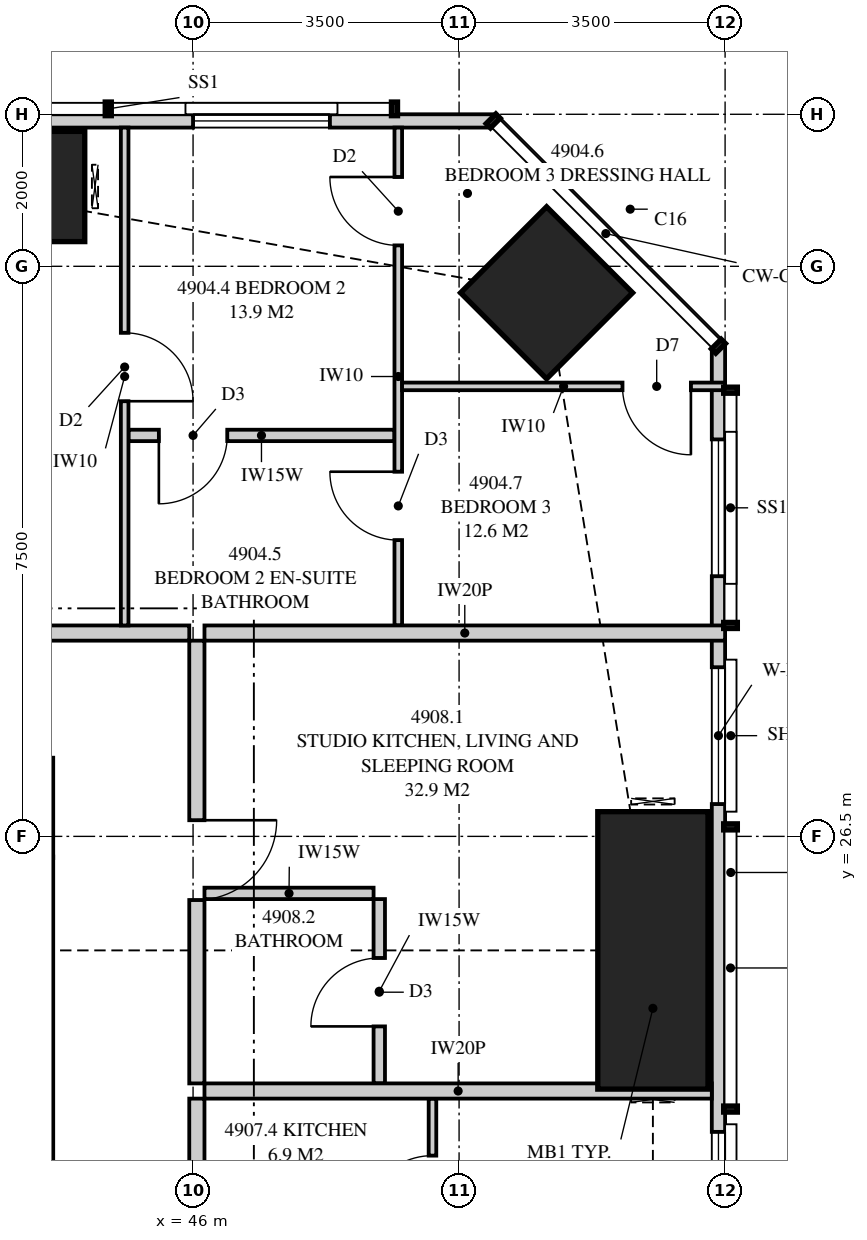
"""IFC4 building model, lengths in metres.
Left out: names, types, materials, properties, quantities, classifications, styles, units other than length and angle.
Written with IfcOpenShell. Run it as: python <this file> out.ifc"""

import sys

from ifc_helpers import new_model, si_unit, direction, frame, frame_2d, origin, origin_2d, place, context, subcontext, project, spatial, polyline, rectangle, outline, extrude, element, fill, save


model = new_model("IFC4")
c1 = context("Model", 3, precision=1e-05, world=origin(), true_north=direction((0.0, 1.0)))
c2 = subcontext(c1, "Body", "Model", "MODEL_VIEW")
j1 = project(units=[si_unit("LENGTHUNIT", "METRE"), si_unit("PLANEANGLEUNIT", "RADIAN")], contexts=[c1])
p1 = place(None, origin())
s1 = spatial("IfcSite", under=j1, at=p1, CompositionType="ELEMENT")
p2 = place(p1, origin())
s2 = spatial("IfcBuilding", under=s1, at=p2, CompositionType="ELEMENT")
p3 = place(p2, frame((0.0, 0.0, 181.15)))
s3 = spatial("IfcBuildingStorey", under=s2, at=p3, CompositionType="ELEMENT", Elevation=181.15)
p4 = place(p3, frame((52.05, 25.0, 0.0), z_axis=(0.0, 0.0, 1.0), x_axis=(1.0, 0.0, 0.0)))
e1 = element("IfcColumn", 1, at=p4, inside=s3, PredefinedType="COLUMN", context=c2, shape_type="SweptSolid", body=[
    extrude(rectangle(XDim=1.45, YDim=3.65, at=origin_2d()), origin(), (0.0, 0.0, 1.0), 3.35),
])
p5 = place(p3, frame((50.652, 33.652, 0.0), z_axis=(0.0, 0.0, 1.0), x_axis=(0.707106781187, 0.707106781187, 0.0)))
e2 = element("IfcColumn", 2, at=p5, inside=s3, PredefinedType="COLUMN", context=c2, shape_type="SweptSolid", body=[
    extrude(rectangle(XDim=1.6, YDim=1.6, at=origin_2d()), origin(), (0.0, 0.0, 1.0), 3.35),
])
p6 = place(p3, frame((42.75, 35.05, 0.0), z_axis=(0.0, 0.0, 1.0), x_axis=(0.0, 1.0, 0.0)))
e3 = element("IfcColumn", 3, at=p6, inside=s3, PredefinedType="COLUMN", context=c2, shape_type="SweptSolid", body=[
    extrude(rectangle(XDim=1.45, YDim=3.65, at=origin_2d()), origin(), (0.0, 0.0, 1.0), 3.35),
])
p7 = place(p3, frame((43.8, 19.3, 0.0), z_axis=(0.0, 0.0, 1.0), x_axis=(0.0, 1.0, 0.0)))
e4 = element("IfcWall", 4, at=p7, inside=s3, PredefinedType="SHEAR", context=c2, shape_type="SweptSolid", body=[
    extrude(rectangle(XDim=6.925, YDim=0.7, at=frame_2d((3.462, 0.0))), origin(), (0.0, 0.0, 1.0), 3.35),
])
p8 = place(p3, frame((52.913, 3.051, 0.0), z_axis=(0.0, 0.0, 1.0), x_axis=(0.0, 1.0, 0.0)))
e5 = element("IfcWall", 5, at=p8, inside=s3, PredefinedType="SOLIDWALL", context=c2, shape_type="SweptSolid", body=[
    extrude(outline(polyline([(0.0, 0.0), (29.897, 0.0), (29.897, 3.11), (22.167, 3.11), (22.167, 2.15), (22.074, 2.15), (22.074, 3.11), (21.949, 3.11), (21.949, 2.15), (9.949, 2.15), (9.949, 3.11), (9.847, 3.11), (9.847, 2.15), (9.706, 2.15), (9.706, 3.11), (0.0, 3.11), (0.0, 0.0)])), frame((0.0, 0.087, 0.0), z_axis=(0.0, -1.0, 0.0), x_axis=(1.0, 0.0, 0.0)), (0.0, 0.0, 1.0), 0.175),
])
p9 = place(p8, frame((6.808, 0.0, 0.4)))
e6 = element("IfcOpeningElement", 6, at=p9, cuts=e5, PredefinedType="OPENING", context=c2, shape_type="SweptSolid", body=[
    extrude(rectangle(XDim=1.2, YDim=1.7, at=frame_2d((0.6, 0.85))), frame((0.0, 0.097, 0.0), z_axis=(0.0, -1.0, 0.0), x_axis=(1.0, 0.0, 0.0)), (0.0, 0.0, 1.0), 0.195),
])
p10 = place(p8, frame((12.424, 0.0, 0.4)))
e7 = element("IfcOpeningElement", 7, at=p10, cuts=e5, PredefinedType="OPENING", context=c2, shape_type="SweptSolid", body=[
    extrude(rectangle(XDim=1.8, YDim=1.7, at=frame_2d((0.9, 0.85))), frame((0.0, 0.097, 0.0), z_axis=(0.0, -1.0, 0.0), x_axis=(1.0, 0.0, 0.0)), (0.0, 0.0, 1.0), 0.195),
])
p11 = place(p8, frame((15.324, 0.0, 0.0)))
e8 = element("IfcOpeningElement", 8, at=p11, cuts=e5, PredefinedType="OPENING", context=c2, shape_type="SweptSolid", body=[
    extrude(rectangle(XDim=1.8, YDim=2.1, at=frame_2d((0.9, 1.05))), frame((0.0, 0.097, 0.0), z_axis=(0.0, -1.0, 0.0), x_axis=(1.0, 0.0, 0.0)), (0.0, 0.0, 1.0), 0.195),
])
p12 = place(p8, frame((17.761, 0.0, 0.4)))
e9 = element("IfcOpeningElement", 9, at=p12, cuts=e5, PredefinedType="OPENING", context=c2, shape_type="SweptSolid", body=[
    extrude(rectangle(XDim=1.8, YDim=1.7, at=frame_2d((0.9, 0.85))), frame((0.0, 0.097, 0.0), z_axis=(0.0, -1.0, 0.0), x_axis=(1.0, 0.0, 0.0)), (0.0, 0.0, 1.0), 0.195),
])
p13 = place(p8, frame((23.874, 0.0, 0.4)))
e10 = element("IfcOpeningElement", 10, at=p13, cuts=e5, PredefinedType="OPENING", context=c2, shape_type="SweptSolid", body=[
    extrude(rectangle(XDim=1.8, YDim=1.7, at=frame_2d((0.9, 0.85))), frame((0.0, 0.097, 0.0), z_axis=(0.0, -1.0, 0.0), x_axis=(1.0, 0.0, 0.0)), (0.0, 0.0, 1.0), 0.195),
])
p14 = place(p8, frame((26.871, 0.0, 0.4)))
e11 = element("IfcOpeningElement", 11, at=p14, cuts=e5, PredefinedType="OPENING", context=c2, shape_type="SweptSolid", body=[
    extrude(rectangle(XDim=1.8, YDim=1.7, at=frame_2d((0.9, 0.85))), frame((0.0, 0.097, 0.0), z_axis=(0.0, -1.0, 0.0), x_axis=(1.0, 0.0, 0.0)), (0.0, 0.0, 1.0), 0.195),
])
p15 = place(p3, frame((49.949, 35.913, 0.0), z_axis=(0.0, 0.0, 1.0), x_axis=(-1.0, 0.0, 0.0)))
e12 = element("IfcWall", 12, at=p15, inside=s3, PredefinedType="SOLIDWALL", context=c2, shape_type="SweptSolid", body=[
    extrude(outline(polyline([(0.0, 0.0), (34.897, 0.0), (34.897, 3.11), (27.91, 3.11), (27.91, 2.15), (27.836, 2.15), (27.836, 3.11), (27.699, 3.11), (27.699, 2.15), (7.199, 2.15), (7.199, 3.11), (7.062, 3.11), (7.062, 2.15), (6.987, 2.15), (6.987, 3.11), (0.0, 3.11), (0.0, 0.0)])), frame((0.0, 0.087, 0.0), z_axis=(0.0, -1.0, 0.0), x_axis=(1.0, 0.0, 0.0)), (0.0, 0.0, 1.0), 0.175),
])
p16 = place(p15, frame((2.149, 0.0, 0.4)))
e13 = element("IfcOpeningElement", 13, at=p16, cuts=e12, PredefinedType="OPENING", context=c2, shape_type="SweptSolid", body=[
    extrude(rectangle(XDim=1.8, YDim=1.7, at=frame_2d((0.9, 0.85))), frame((0.0, 0.097, 0.0), z_axis=(0.0, -1.0, 0.0), x_axis=(1.0, 0.0, 0.0)), (0.0, 0.0, 1.0), 0.195),
])
p17 = place(p15, frame((9.13, 0.0, 0.4)))
e14 = element("IfcOpeningElement", 14, at=p17, cuts=e12, PredefinedType="OPENING", context=c2, shape_type="SweptSolid", body=[
    extrude(rectangle(XDim=1.2, YDim=1.7, at=frame_2d((0.6, 0.85))), frame((0.0, 0.097, 0.0), z_axis=(0.0, -1.0, 0.0), x_axis=(1.0, 0.0, 0.0)), (0.0, 0.0, 1.0), 0.195),
])
p18 = place(p15, frame((13.174, 0.0, 0.0)))
e15 = element("IfcOpeningElement", 15, at=p18, cuts=e12, PredefinedType="OPENING", context=c2, shape_type="SweptSolid", body=[
    extrude(rectangle(XDim=1.8, YDim=2.1, at=frame_2d((0.9, 1.05))), frame((0.0, 0.097, 0.0), z_axis=(0.0, -1.0, 0.0), x_axis=(1.0, 0.0, 0.0)), (0.0, 0.0, 1.0), 0.195),
])
p19 = place(p15, frame((20.724, 0.0, 0.4)))
e16 = element("IfcOpeningElement", 16, at=p19, cuts=e12, PredefinedType="OPENING", context=c2, shape_type="SweptSolid", body=[
    extrude(rectangle(XDim=1.8, YDim=1.7, at=frame_2d((0.9, 0.85))), frame((0.0, 0.097, 0.0), z_axis=(0.0, -1.0, 0.0), x_axis=(1.0, 0.0, 0.0)), (0.0, 0.0, 1.0), 0.195),
])
p20 = place(p15, frame((23.929, 0.0, 0.4)))
e17 = element("IfcOpeningElement", 17, at=p20, cuts=e12, PredefinedType="OPENING", context=c2, shape_type="SweptSolid", body=[
    extrude(rectangle(XDim=1.8, YDim=1.7, at=frame_2d((0.9, 0.85))), frame((0.0, 0.097, 0.0), z_axis=(0.0, -1.0, 0.0), x_axis=(1.0, 0.0, 0.0)), (0.0, 0.0, 1.0), 0.195),
])
p21 = place(p15, frame((31.523, 0.0, 0.4)))
e18 = element("IfcOpeningElement", 18, at=p21, cuts=e12, PredefinedType="OPENING", context=c2, shape_type="SweptSolid", body=[
    extrude(rectangle(XDim=1.2, YDim=1.7, at=frame_2d((0.6, 0.85))), frame((0.0, 0.097, 0.0), z_axis=(0.0, -1.0, 0.0), x_axis=(1.0, 0.0, 0.0)), (0.0, 0.0, 1.0), 0.195),
])
p22 = place(p3, frame((45.1, 35.825, 0.0), z_axis=(0.0, 0.0, 1.0), x_axis=(0.0, -1.0, 0.0)))
e19 = element("IfcWall", 19, at=p22, inside=s3, PredefinedType="PARTITIONING", context=c2, shape_type="SweptSolid", body=[
    extrude(outline(polyline([(0.0, 0.0), (6.55, 0.0), (6.55, 3.11), (2.064, 3.11), (2.064, 2.15), (0.318, 2.15), (0.318, 3.11), (0.0, 3.11), (0.0, 0.0)])), frame((0.0, 0.05, 0.0), z_axis=(0.0, -1.0, 0.0), x_axis=(1.0, 0.0, 0.0)), (0.0, 0.0, 1.0), 0.1),
])
p23 = place(p22, frame((2.7, 0.0, 0.0)))
e20 = element("IfcOpeningElement", 20, at=p23, cuts=e19, PredefinedType="OPENING", context=c2, shape_type="SweptSolid", body=[
    extrude(rectangle(XDim=0.9, YDim=2.1, at=frame_2d((0.45, 1.05))), frame((0.0, 0.06, 0.0), z_axis=(0.0, -1.0, 0.0), x_axis=(1.0, 0.0, 0.0)), (0.0, 0.0, 1.0), 0.12),
])
p24 = place(p3, frame((48.7, 35.825, 0.0), z_axis=(0.0, 0.0, 1.0), x_axis=(0.0, -1.0, 0.0)))
e21 = element("IfcWall", 21, at=p24, inside=s3, PredefinedType="PARTITIONING", context=c2, shape_type="SweptSolid", body=[
    extrude(outline(polyline([(0.0, 0.0), (6.55, 0.0), (6.55, 3.11), (2.701, 3.11), (2.701, 2.15), (0.955, 2.15), (0.955, 3.11), (0.0, 3.11), (0.0, 0.0)])), frame((0.0, 0.05, 0.0), z_axis=(0.0, -1.0, 0.0), x_axis=(1.0, 0.0, 0.0)), (0.0, 0.0, 1.0), 0.1),
])
p25 = place(p24, frame((0.65, 0.0, 0.0)))
e22 = element("IfcOpeningElement", 22, at=p25, cuts=e21, PredefinedType="OPENING", context=c2, shape_type="SweptSolid", body=[
    extrude(rectangle(XDim=0.9, YDim=2.1, at=frame_2d((0.45, 1.05))), frame((0.0, 0.06, 0.0), z_axis=(0.0, -1.0, 0.0), x_axis=(1.0, 0.0, 0.0)), (0.0, 0.0, 1.0), 0.12),
])
p26 = place(p24, frame((4.527, 0.0, 0.0)))
e23 = element("IfcOpeningElement", 23, at=p26, cuts=e21, PredefinedType="OPENING", context=c2, shape_type="SweptSolid", body=[
    extrude(rectangle(XDim=0.9, YDim=2.1, at=frame_2d((0.45, 1.05))), frame((0.0, 0.06, 0.0), z_axis=(0.0, -1.0, 0.0), x_axis=(1.0, 0.0, 0.0)), (0.0, 0.0, 1.0), 0.12),
])
p27 = place(p3, frame((45.15, 31.775, 0.0), z_axis=(0.0, 0.0, 1.0), x_axis=(1.0, 0.0, 0.0)))
e24 = element("IfcWall", 24, at=p27, inside=s3, PredefinedType="PLUMBINGWALL", context=c2, shape_type="SweptSolid", body=[
    extrude(rectangle(XDim=3.5, YDim=0.15, at=frame_2d((1.75, 0.0))), origin(), (0.0, 0.0, 1.0), 3.11),
])
p28 = place(p27, frame((0.4, 0.0, 0.0)))
e25 = element("IfcOpeningElement", 25, at=p28, cuts=e24, PredefinedType="OPENING", context=c2, shape_type="SweptSolid", body=[
    extrude(rectangle(XDim=0.9, YDim=2.1, at=frame_2d((0.45, 1.05))), frame((0.0, 0.085, 0.0), z_axis=(0.0, -1.0, 0.0), x_axis=(1.0, 0.0, 0.0)), (0.0, 0.0, 1.0), 0.17),
])
p29 = place(p3, frame((48.75, 32.42, 0.0), z_axis=(0.0, 0.0, 1.0), x_axis=(1.0, 0.0, 0.0)))
e26 = element("IfcWall", 26, at=p29, inside=s3, PredefinedType="PARTITIONING", context=c2, shape_type="SweptSolid", body=[
    extrude(outline(polyline([(0.0, 0.0), (4.25, 0.0), (4.25, 3.11), (2.972, 3.11), (2.972, 2.15), (1.229, 2.15), (1.229, 3.11), (0.0, 3.11), (0.0, 0.0)])), frame((0.0, 0.05, 0.0), z_axis=(0.0, -1.0, 0.0), x_axis=(1.0, 0.0, 0.0)), (0.0, 0.0, 1.0), 0.1),
])
p30 = place(p29, frame((2.9, 0.0, 0.0)))
e27 = element("IfcOpeningElement", 27, at=p30, cuts=e26, PredefinedType="OPENING", context=c2, shape_type="SweptSolid", body=[
    extrude(rectangle(XDim=0.9, YDim=2.1, at=frame_2d((0.45, 1.05))), frame((0.0, 0.06, 0.0), z_axis=(0.0, -1.0, 0.0), x_axis=(1.0, 0.0, 0.0)), (0.0, 0.0, 1.0), 0.12),
])
p31 = place(p3, frame((46.15, 29.175, 0.0), z_axis=(0.0, 0.0, 1.0), x_axis=(1.0, 0.0, 0.0)))
e28 = element("IfcWall", 28, at=p31, inside=s3, PredefinedType="PARTITIONING", context=c2, shape_type="SweptSolid", body=[
    extrude(outline(polyline([(0.0, 0.0), (6.85, 0.0), (6.85, 3.11), (6.147, 3.11), (6.147, 2.15), (4.303, 2.15), (4.303, 3.11), (0.0, 3.11), (0.0, 0.0)])), frame((0.0, 0.1, 0.0), z_axis=(0.0, -1.0, 0.0), x_axis=(1.0, 0.0, 0.0)), (0.0, 0.0, 1.0), 0.2),
])
p32 = place(p3, frame((52.825, 23.15, 0.0), z_axis=(0.0, 0.0, 1.0), x_axis=(-1.0, 0.0, 0.0)))
e29 = element("IfcWall", 29, at=p32, inside=s3, PredefinedType="PARTITIONING", context=c2, shape_type="SweptSolid", body=[
    extrude(outline(polyline([(0.0, 0.0), (6.675, 0.0), (6.675, 3.11), (1.685, 3.11), (1.685, 2.15), (0.0, 2.15), (0.0, 3.11), (0.0, 0.0)])), frame((0.0, 0.1, 0.0), z_axis=(0.0, -1.0, 0.0), x_axis=(1.0, 0.0, 0.0)), (0.0, 0.0, 1.0), 0.2),
])
p33 = place(p3, frame((46.05, 14.9, 0.0), z_axis=(0.0, 0.0, 1.0), x_axis=(0.0, 1.0, 0.0)))
e30 = element("IfcWall", 30, at=p33, inside=s3, PredefinedType="PARTITIONING", context=c2, shape_type="SweptSolid", body=[
    extrude(rectangle(XDim=8.15, YDim=0.2, at=frame_2d((4.075, 0.0))), origin(), (0.0, 0.0, 1.0), 3.11),
])
p34 = place(p33, frame((3.575, 0.0, 0.0)))
e31 = element("IfcOpeningElement", 31, at=p34, cuts=e30, PredefinedType="OPENING", context=c2, shape_type="SweptSolid", body=[
    extrude(rectangle(XDim=1.05, YDim=2.2, at=frame_2d((0.525, 1.1))), frame((0.0, 0.11, 0.0), z_axis=(0.0, -1.0, 0.0), x_axis=(1.0, 0.0, 0.0)), (0.0, 0.0, 1.0), 0.22),
])
p35 = place(p3, frame((49.15, 20.7, 0.0), z_axis=(0.0, 0.0, 1.0), x_axis=(0.0, 1.0, 0.0)))
e32 = element("IfcWall", 32, at=p35, inside=s3, PredefinedType="PARTITIONING", context=c2, shape_type="SweptSolid", body=[
    extrude(rectangle(XDim=2.35, YDim=0.1, at=frame_2d((1.175, 0.0))), origin(), (0.0, 0.0, 1.0), 3.11),
])
p36 = place(p35, frame((0.7, 0.0, 0.0)))
e33 = element("IfcOpeningElement", 33, at=p36, cuts=e32, PredefinedType="OPENING", context=c2, shape_type="SweptSolid", body=[
    extrude(rectangle(XDim=0.9, YDim=2.1, at=frame_2d((0.45, 1.05))), frame((0.0, 0.06, 0.0), z_axis=(0.0, -1.0, 0.0), x_axis=(1.0, 0.0, 0.0)), (0.0, 0.0, 1.0), 0.12),
])
p37 = place(p3, frame((46.05, 23.25, 0.0), z_axis=(0.0, 0.0, 1.0), x_axis=(0.0, 1.0, 0.0)))
e34 = element("IfcWall", 34, at=p37, inside=s3, PredefinedType="PARTITIONING", context=c2, shape_type="SweptSolid", body=[
    extrude(outline(polyline([(0.0, 0.0), (5.825, 0.0), (5.825, 3.11), (2.087, 3.11), (2.087, 2.541), (1.413, 2.541), (1.413, 3.11), (0.0, 3.11), (0.0, 0.0)])), frame((0.0, 0.1, 0.0), z_axis=(0.0, -1.0, 0.0), x_axis=(1.0, 0.0, 0.0)), (0.0, 0.0, 1.0), 0.2),
])
p38 = place(p37, frame((2.413, 0.0, 0.0)))
e35 = element("IfcOpeningElement", 35, at=p38, cuts=e34, PredefinedType="OPENING", context=c2, shape_type="SweptSolid", body=[
    extrude(rectangle(XDim=1.05, YDim=2.2, at=frame_2d((0.525, 1.1))), frame((0.0, 0.11, 0.0), z_axis=(0.0, -1.0, 0.0), x_axis=(1.0, 0.0, 0.0)), (0.0, 0.0, 1.0), 0.22),
])
p39 = place(p3, frame((48.45, 23.25, 0.0), z_axis=(0.0, 0.0, 1.0), x_axis=(0.0, 1.0, 0.0)))
e36 = element("IfcWall", 36, at=p39, inside=s3, PredefinedType="PLUMBINGWALL", context=c2, shape_type="SweptSolid", body=[
    extrude(outline(polyline([(0.0, 0.0), (2.425, 0.0), (2.425, 3.11), (2.062, 3.11), (2.062, 2.541), (1.438, 2.541), (1.438, 3.11), (0.0, 3.11), (0.0, 0.0)])), frame((0.0, 0.075, 0.0), z_axis=(0.0, -1.0, 0.0), x_axis=(1.0, 0.0, 0.0)), (0.0, 0.0, 1.0), 0.15),
])
p40 = place(p39, frame((0.75, 0.0, 0.0)))
e37 = element("IfcOpeningElement", 37, at=p40, cuts=e36, PredefinedType="OPENING", context=c2, shape_type="SweptSolid", body=[
    extrude(rectangle(XDim=0.9, YDim=2.1, at=frame_2d((0.45, 1.05))), frame((0.0, 0.085, 0.0), z_axis=(0.0, -1.0, 0.0), x_axis=(1.0, 0.0, 0.0)), (0.0, 0.0, 1.0), 0.17),
])
p41 = place(p3, frame((48.375, 25.75, 0.0), z_axis=(0.0, 0.0, 1.0), x_axis=(-1.0, 0.0, 0.0)))
e38 = element("IfcWall", 38, at=p41, inside=s3, PredefinedType="PLUMBINGWALL", context=c2, shape_type="SweptSolid", body=[
    extrude(rectangle(XDim=2.225, YDim=0.15, at=frame_2d((1.113, 0.0))), origin(), (0.0, 0.0, 1.0), 3.11),
])
p42 = place(p3, frame((38.45, 29.175, 0.0), z_axis=(0.0, 0.0, 1.0), x_axis=(1.0, 0.0, 0.0)))
e39 = element("IfcWall", 39, at=p42, inside=s3, PredefinedType="PARTITIONING", context=c2, shape_type="SweptSolid", body=[
    extrude(outline(polyline([(0.0, 0.0), (7.5, 0.0), (7.5, 3.11), (4.637, 3.11), (4.637, 2.541), (3.963, 2.541), (3.963, 3.11), (0.0, 3.11), (0.0, 0.0)])), frame((0.0, 0.1, 0.0), z_axis=(0.0, -1.0, 0.0), x_axis=(1.0, 0.0, 0.0)), (0.0, 0.0, 1.0), 0.2),
])
p43 = place(p12, origin())
e40 = element("IfcWindow", 40, at=p43, inside=s3, PartitioningType="SINGLE_PANEL", PredefinedType="WINDOW", context=c2, shape_type="SweptSolid", body=[
    extrude(rectangle(XDim=1.8, YDim=1.7, at=frame_2d((0.9, 0.85))), frame((0.0, 0.03, 0.0), z_axis=(0.0, -1.0, 0.0), x_axis=(1.0, 0.0, 0.0)), (0.0, 0.0, 1.0), 0.06),
])
fill(e9, e40)
p44 = place(p13, origin())
e41 = element("IfcWindow", 41, at=p44, inside=s3, PartitioningType="SINGLE_PANEL", PredefinedType="WINDOW", context=c2, shape_type="SweptSolid", body=[
    extrude(rectangle(XDim=1.8, YDim=1.7, at=frame_2d((0.9, 0.85))), frame((0.0, 0.03, 0.0), z_axis=(0.0, -1.0, 0.0), x_axis=(1.0, 0.0, 0.0)), (0.0, 0.0, 1.0), 0.06),
])
fill(e10, e41)
p45 = place(p14, origin())
e42 = element("IfcWindow", 42, at=p45, inside=s3, PartitioningType="SINGLE_PANEL", PredefinedType="WINDOW", context=c2, shape_type="SweptSolid", body=[
    extrude(rectangle(XDim=1.8, YDim=1.7, at=frame_2d((0.9, 0.85))), frame((0.0, 0.03, 0.0), z_axis=(0.0, -1.0, 0.0), x_axis=(1.0, 0.0, 0.0)), (0.0, 0.0, 1.0), 0.06),
])
fill(e11, e42)
p46 = place(p16, origin())
e43 = element("IfcWindow", 43, at=p46, inside=s3, PartitioningType="SINGLE_PANEL", PredefinedType="WINDOW", context=c2, shape_type="SweptSolid", body=[
    extrude(rectangle(XDim=1.8, YDim=1.7, at=frame_2d((0.9, 0.85))), frame((0.0, 0.03, 0.0), z_axis=(0.0, -1.0, 0.0), x_axis=(1.0, 0.0, 0.0)), (0.0, 0.0, 1.0), 0.06),
])
fill(e13, e43)
p47 = place(p23, origin())
e44 = element("IfcDoor", 44, at=p47, inside=s3, OperationType="SINGLE_SWING_RIGHT", PredefinedType="DOOR", context=c2, shape_type="SweptSolid", body=[
    extrude(rectangle(XDim=0.9, YDim=2.1, at=frame_2d((0.45, 1.05))), frame((0.0, 0.025, 0.0), z_axis=(0.0, -1.0, 0.0), x_axis=(1.0, 0.0, 0.0)), (0.0, 0.0, 1.0), 0.05),
])
fill(e20, e44)
p48 = place(p28, frame((0.9, 0.0, 0.0), z_axis=(0.0, 0.0, 1.0), x_axis=(-1.0, 0.0, 0.0)))
e45 = element("IfcDoor", 45, at=p48, inside=s3, OperationType="SINGLE_SWING_RIGHT", PredefinedType="DOOR", context=c2, shape_type="SweptSolid", body=[
    extrude(rectangle(XDim=0.9, YDim=2.1, at=frame_2d((0.45, 1.05))), frame((0.0, 0.025, 0.0), z_axis=(0.0, -1.0, 0.0), x_axis=(1.0, 0.0, 0.0)), (0.0, 0.0, 1.0), 0.05),
])
fill(e25, e45)
p49 = place(p30, frame((0.9, 0.0, 0.0), z_axis=(0.0, 0.0, 1.0), x_axis=(-1.0, 0.0, 0.0)))
e46 = element("IfcDoor", 46, at=p49, inside=s3, OperationType="SINGLE_SWING_LEFT", PredefinedType="DOOR", context=c2, shape_type="SweptSolid", body=[
    extrude(rectangle(XDim=0.9, YDim=2.1, at=frame_2d((0.45, 1.05))), frame((0.0, 0.025, 0.0), z_axis=(0.0, -1.0, 0.0), x_axis=(1.0, 0.0, 0.0)), (0.0, 0.0, 1.0), 0.05),
])
fill(e27, e46)
p50 = place(p25, frame((0.9, 0.0, 0.0), z_axis=(0.0, 0.0, 1.0), x_axis=(-1.0, 0.0, 0.0)))
e47 = element("IfcDoor", 47, at=p50, inside=s3, OperationType="SINGLE_SWING_RIGHT", PredefinedType="DOOR", context=c2, shape_type="SweptSolid", body=[
    extrude(rectangle(XDim=0.9, YDim=2.1, at=frame_2d((0.45, 1.05))), frame((0.0, 0.025, 0.0), z_axis=(0.0, -1.0, 0.0), x_axis=(1.0, 0.0, 0.0)), (0.0, 0.0, 1.0), 0.05),
])
fill(e22, e47)
p51 = place(p26, frame((0.9, 0.0, 0.0), z_axis=(0.0, 0.0, 1.0), x_axis=(-1.0, 0.0, 0.0)))
e48 = element("IfcDoor", 48, at=p51, inside=s3, OperationType="SINGLE_SWING_RIGHT", PredefinedType="DOOR", context=c2, shape_type="SweptSolid", body=[
    extrude(rectangle(XDim=0.9, YDim=2.1, at=frame_2d((0.45, 1.05))), frame((0.0, 0.025, 0.0), z_axis=(0.0, -1.0, 0.0), x_axis=(1.0, 0.0, 0.0)), (0.0, 0.0, 1.0), 0.05),
])
fill(e23, e48)
p52 = place(p36, origin())
e49 = element("IfcDoor", 49, at=p52, inside=s3, OperationType="SINGLE_SWING_LEFT", PredefinedType="DOOR", context=c2, shape_type="SweptSolid", body=[
    extrude(rectangle(XDim=0.9, YDim=2.1, at=frame_2d((0.45, 1.05))), frame((0.0, 0.025, 0.0), z_axis=(0.0, -1.0, 0.0), x_axis=(1.0, 0.0, 0.0)), (0.0, 0.0, 1.0), 0.05),
])
fill(e33, e49)
p53 = place(p38, frame((1.05, 0.0, 0.0), z_axis=(0.0, 0.0, 1.0), x_axis=(-1.0, 0.0, 0.0)))
e50 = element("IfcDoor", 50, at=p53, inside=s3, OperationType="SINGLE_SWING_LEFT", PredefinedType="DOOR", context=c2, shape_type="SweptSolid", body=[
    extrude(rectangle(XDim=1.05, YDim=2.2, at=frame_2d((0.525, 1.1))), frame((0.0, 0.025, 0.0), z_axis=(0.0, -1.0, 0.0), x_axis=(1.0, 0.0, 0.0)), (0.0, 0.0, 1.0), 0.05),
])
fill(e35, e50)
p54 = place(p40, origin())
e51 = element("IfcDoor", 51, at=p54, inside=s3, OperationType="SINGLE_SWING_LEFT", PredefinedType="DOOR", context=c2, shape_type="SweptSolid", body=[
    extrude(rectangle(XDim=0.9, YDim=2.1, at=frame_2d((0.45, 1.05))), frame((0.0, 0.025, 0.0), z_axis=(0.0, -1.0, 0.0), x_axis=(1.0, 0.0, 0.0)), (0.0, 0.0, 1.0), 0.05),
])
fill(e37, e51)
save(model, sys.argv[1])
